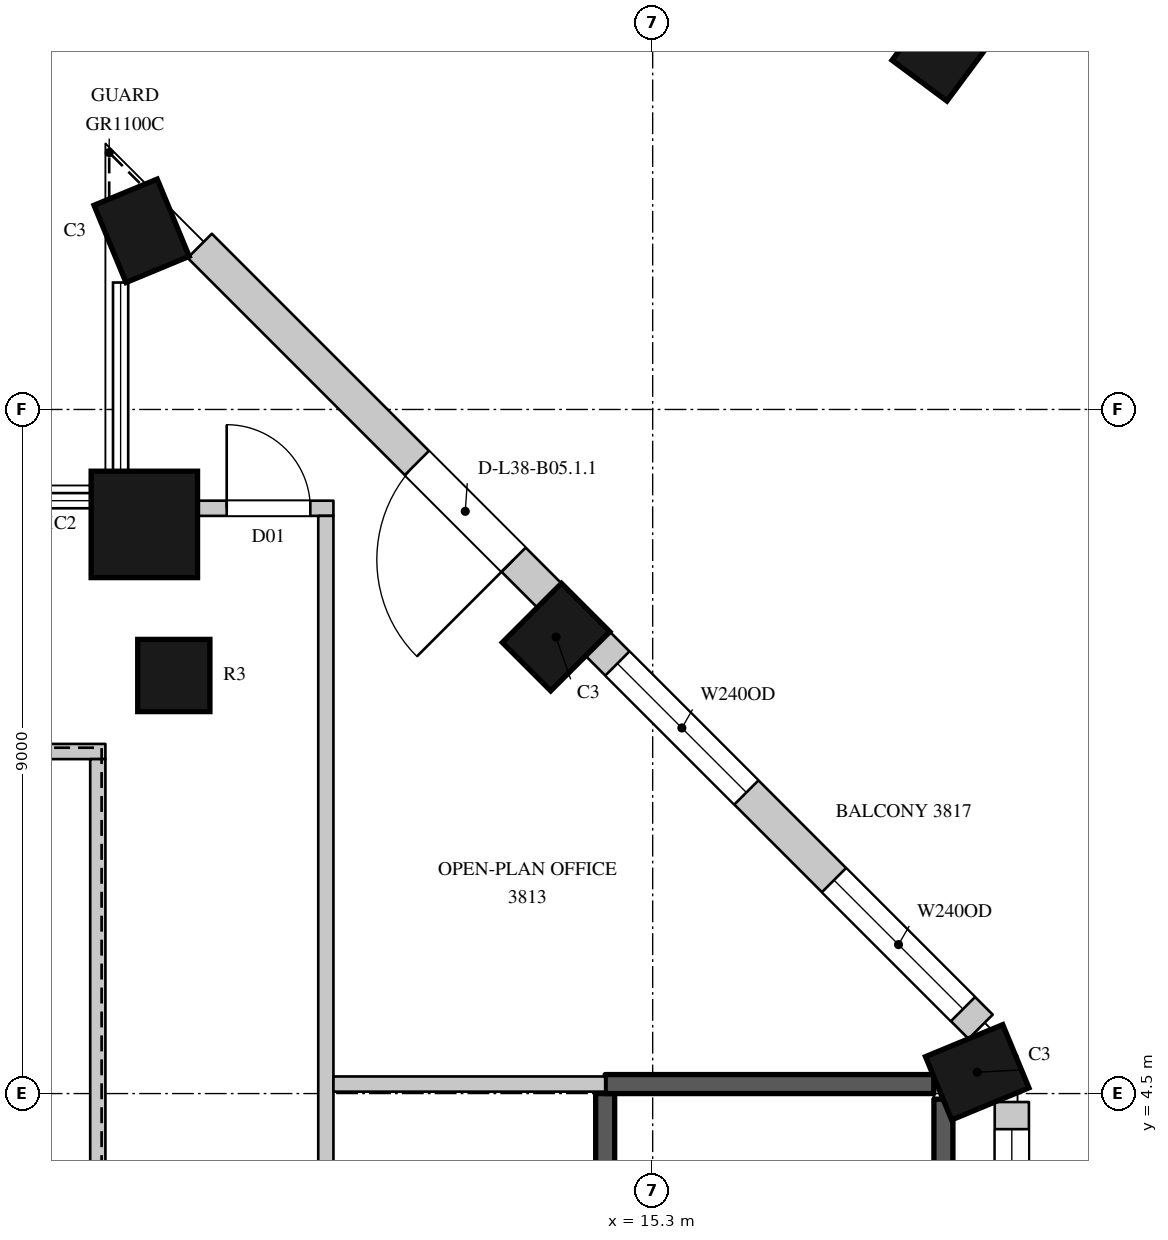
"""IFC4 building model, lengths in metres.
Left out: names, types, materials, properties, quantities, classifications, styles, units other than length and angle.
Written with IfcOpenShell. Run it as: python <this file> out.ifc"""

import sys

from ifc_helpers import new_model, si_unit, direction, frame, frame_2d, origin, origin_2d, place, context, subcontext, project, spatial, rectangle, circle, extrude, element, fill, save


model = new_model("IFC4")
c1 = context("Model", 3, precision=1e-05, world=origin(), true_north=direction((0.0, 1.0)))
c2 = subcontext(c1, "Body", "Model", "MODEL_VIEW")
j1 = project(units=[si_unit("LENGTHUNIT", "METRE"), si_unit("PLANEANGLEUNIT", "RADIAN")], contexts=[c1])
p1 = place(None, origin())
s1 = spatial("IfcSite", under=j1, at=p1, CompositionType="ELEMENT")
p2 = place(p1, origin())
s2 = spatial("IfcBuilding", under=s1, at=p2, CompositionType="ELEMENT")
p3 = place(p2, frame((0.0, 0.0, 176.9)))
s3 = spatial("IfcBuildingStorey", under=s2, at=p3, CompositionType="ELEMENT", Elevation=176.9)
for number, where, z_axis, x_axis in (
    (1, (19.57, 4.78, 0.0), (0.0, 0.0, 1.0), (-0.383, 0.924, 0.0)),
    (2, (14.029, 10.505, 0.0), (0.0, 0.0, 1.0), (-0.707, 0.707, 0.0)),
    (3, (8.576, 15.85, 0.0), (0.0, 0.0, 1.0), (-0.924, -0.383, 0.0)),
):
    element("IfcColumn", number, at=place(p3, frame(where, z_axis=z_axis, x_axis=x_axis)), inside=s3, PredefinedType="COLUMN", context=c2, shape_type="SweptSolid", body=[
        extrude(rectangle(XDim=0.9, YDim=1.1, at=origin_2d()), origin(), (0.0, 0.0, 1.0), 4.1),
    ])
p4 = place(p3, frame((8.612, 11.988, 0.0), z_axis=(0.0, 0.0, 1.0), x_axis=(1.0, 0.0, 0.0)))
e4 = element("IfcColumn", 4, at=p4, inside=s3, PredefinedType="COLUMN", context=c2, shape_type="SweptSolid", body=[
    extrude(circle(Radius=0.7, at=origin_2d()), origin(), (0.0, 0.0, 1.0), 4.1),
])
p5 = place(p3, frame((19.138, 18.268, 0.0), z_axis=(0.0, 0.0, 1.0), x_axis=(-0.802798546114, 0.596250362144, 0.0)))
e5 = element("IfcColumn", 5, at=p5, inside=s3, PredefinedType="COLUMN", context=c2, shape_type="SweptSolid", body=[
    extrude(rectangle(XDim=0.9, YDim=1.1, at=origin_2d()), origin(), (0.0, 0.0, 1.0), 4.1),
])
p6 = place(p3, frame((9.0, 10.0, 0.0), z_axis=(0.0, 0.0, 1.0), x_axis=(1.0, 0.0, 0.0)))
e6 = element("IfcColumn", 6, at=p6, inside=s3, PredefinedType="COLUMN", context=c2, shape_type="SweptSolid", body=[
    extrude(circle(Radius=0.475, at=origin_2d()), origin(), (0.0, 0.0, 1.0), 4.1),
])
p7 = place(p3, frame((20.025, -4.05, 0.0), z_axis=(0.0, 0.0, 1.0), x_axis=(0.0, 1.0, 0.0)))
e7 = element("IfcWall", 7, at=p7, inside=s3, PredefinedType="SOLIDWALL", context=c2, shape_type="SweptSolid", body=[
    extrude(rectangle(XDim=8.439, YDim=0.45, at=frame_2d((4.219, 0.0))), origin(), (0.0, 0.0, 1.0), 3.8),
])
p8 = place(p7, frame((0.394, 0.0, 1.05)))
e8 = element("IfcOpeningElement", 8, at=p8, cuts=e7, PredefinedType="OPENING", context=c2, shape_type="SweptSolid", body=[
    extrude(rectangle(XDim=3.0, YDim=2.4, at=frame_2d((1.5, 1.2))), frame((0.0, 0.235, 0.0), z_axis=(0.0, -1.0, 0.0), x_axis=(1.0, 0.0, 0.0)), (0.0, 0.0, 1.0), 0.47),
])
p9 = place(p7, frame((5.082, 0.0, 1.05)))
e9 = element("IfcOpeningElement", 9, at=p9, cuts=e7, PredefinedType="OPENING", context=c2, shape_type="SweptSolid", body=[
    extrude(rectangle(XDim=3.0, YDim=2.4, at=frame_2d((1.5, 1.2))), frame((0.0, 0.235, 0.0), z_axis=(0.0, -1.0, 0.0), x_axis=(1.0, 0.0, 0.0)), (0.0, 0.0, 1.0), 0.47),
])
p10 = place(p3, frame((19.615, 5.379, 0.0), z_axis=(0.0, 0.0, 1.0), x_axis=(-0.707089646058, 0.7071239159, 0.0)))
e10 = element("IfcWall", 10, at=p10, inside=s3, PredefinedType="SOLIDWALL", context=c2, shape_type="SweptSolid", body=[
    extrude(rectangle(XDim=7.124, YDim=0.45, at=frame_2d((3.562, 0.0))), origin(), (0.0, 0.0, 1.0), 3.8),
])
p11 = place(p10, frame((0.328, 0.0, 1.05)))
e11 = element("IfcOpeningElement", 11, at=p11, cuts=e10, PredefinedType="OPENING", context=c2, shape_type="SweptSolid", body=[
    extrude(rectangle(XDim=2.4, YDim=2.4, at=frame_2d((1.2, 1.2))), frame((0.0, 0.235, 0.0), z_axis=(0.0, -1.0, 0.0), x_axis=(1.0, 0.0, 0.0)), (0.0, 0.0, 1.0), 0.47),
])
p12 = place(p10, frame((4.359, 0.0, 1.05)))
e12 = element("IfcOpeningElement", 12, at=p12, cuts=e10, PredefinedType="OPENING", context=c2, shape_type="SweptSolid", body=[
    extrude(rectangle(XDim=2.4, YDim=2.4, at=frame_2d((1.2, 1.2))), frame((0.0, 0.235, 0.0), z_axis=(0.0, -1.0, 0.0), x_axis=(1.0, 0.0, 0.0)), (0.0, 0.0, 1.0), 0.47),
])
p13 = place(p3, frame((13.941, 11.053, 0.0), z_axis=(0.0, 0.0, 1.0), x_axis=(-0.707106781187, 0.707106781187, 0.0)))
e13 = element("IfcWall", 13, at=p13, inside=s3, PredefinedType="SOLIDWALL", context=c2, shape_type="SweptSolid", body=[
    extrude(rectangle(XDim=6.505, YDim=0.45, at=frame_2d((3.252, 0.0))), origin(), (0.0, 0.0, 1.0), 3.8),
])
p14 = place(p13, frame((0.665, 0.0, 0.0)))
e14 = element("IfcOpeningElement", 14, at=p14, cuts=e13, PredefinedType="OPENING", context=c2, shape_type="SweptSolid", body=[
    extrude(rectangle(XDim=1.8, YDim=2.4, at=frame_2d((0.9, 1.2))), frame((0.0, 0.235, 0.0), z_axis=(0.0, -1.0, 0.0), x_axis=(1.0, 0.0, 0.0)), (0.0, 0.0, 1.0), 0.47),
])
p15 = place(p3, frame((12.251, 14.263, 0.0), z_axis=(0.0, 0.0, 1.0), x_axis=(-0.707039709166, 0.707173846846, 0.0)))
e15 = element("IfcWall", 15, at=p15, inside=s3, PredefinedType="SOLIDWALL", context=c2, shape_type="SweptSolid", body=[
    extrude(rectangle(XDim=1.82, YDim=0.45, at=frame_2d((0.91, 0.0))), origin(), (0.0, 0.0, 1.0), 0.6),
])
p16 = place(p3, frame((-2.48, 9.0, 0.0), z_axis=(0.0, 0.0, 1.0), x_axis=(1.0, 0.0, 0.0)))
e16 = element("IfcWall", 16, at=p16, inside=s3, PredefinedType="PARTITIONING", context=c2, shape_type="SweptSolid", body=[
    extrude(rectangle(XDim=10.58, YDim=0.2, at=frame_2d((5.29, 0.0))), origin(), (0.0, 0.0, 1.0), 3.8),
])
p17 = place(p3, frame((8.0, -8.9, 0.0), z_axis=(0.0, 0.0, 1.0), x_axis=(0.0, 1.0, 0.0)))
e17 = element("IfcWall", 17, at=p17, inside=s3, PredefinedType="PARTITIONING", context=c2, shape_type="SweptSolid", body=[
    extrude(rectangle(XDim=17.8, YDim=0.2, at=frame_2d((8.9, 0.0))), origin(), (0.0, 0.0, 1.0), 3.8),
])
p18 = place(p3, frame((9.296, 12.2, 0.0), z_axis=(0.0, 0.0, 1.0), x_axis=(1.0, 0.0, 0.0)))
e18 = element("IfcWall", 18, at=p18, inside=s3, PredefinedType="PARTITIONING", context=c2, shape_type="SweptSolid", body=[
    extrude(rectangle(XDim=1.804, YDim=0.2, at=frame_2d((0.902, 0.0))), origin(), (0.0, 0.0, 1.0), 3.8),
])
p19 = place(p18, frame((0.4, 0.0, 0.0)))
e19 = element("IfcOpeningElement", 19, at=p19, cuts=e18, PredefinedType="OPENING", context=c2, shape_type="SweptSolid", body=[
    extrude(rectangle(XDim=1.1, YDim=2.4, at=frame_2d((0.55, 1.2))), frame((0.0, 0.11, 0.0), z_axis=(0.0, -1.0, 0.0), x_axis=(1.0, 0.0, 0.0)), (0.0, 0.0, 1.0), 0.22),
])
p20 = place(p3, frame((11.0, -12.0, 0.0), z_axis=(0.0, 0.0, 1.0), x_axis=(0.0, 1.0, 0.0)))
e20 = element("IfcWall", 20, at=p20, inside=s3, PredefinedType="PARTITIONING", context=c2, shape_type="SweptSolid", body=[
    extrude(rectangle(XDim=24.1, YDim=0.2, at=frame_2d((12.05, 0.0))), origin(), (0.0, 0.0, 1.0), 3.8),
])
p21 = place(p20, frame((9.85, 0.0, 0.0)))
e21 = element("IfcOpeningElement", 21, at=p21, cuts=e20, PredefinedType="OPENING", context=c2, shape_type="SweptSolid", body=[
    extrude(rectangle(XDim=1.5, YDim=2.4, at=frame_2d((0.75, 1.2))), frame((0.0, 0.11, 0.0), z_axis=(0.0, -1.0, 0.0), x_axis=(1.0, 0.0, 0.0)), (0.0, 0.0, 1.0), 0.22),
])
p22 = place(p20, frame((3.15, 0.0, 0.0)))
e22 = element("IfcOpeningElement", 22, at=p22, cuts=e20, PredefinedType="OPENING", context=c2, shape_type="SweptSolid", body=[
    extrude(rectangle(XDim=1.1, YDim=2.4, at=frame_2d((0.55, 1.2))), frame((0.0, 0.11, 0.0), z_axis=(0.0, -1.0, 0.0), x_axis=(1.0, 0.0, 0.0)), (0.0, 0.0, 1.0), 0.22),
])
p23 = place(p3, frame((11.1, 4.625, 0.0), z_axis=(0.0, 0.0, 1.0), x_axis=(1.0, 0.0, 0.0)))
e23 = element("IfcWall", 23, at=p23, inside=s3, PredefinedType="PARTITIONING", context=c2, shape_type="SweptSolid", body=[
    extrude(rectangle(XDim=3.575, YDim=0.2, at=frame_2d((1.788, 0.0))), origin(), (0.0, 0.0, 1.0), 3.8),
])
p24 = place(p3, frame((14.675, -4.5, 0.0), z_axis=(0.0, 0.0, 1.0), x_axis=(0.0, 1.0, 0.0)))
e24 = element("IfcWall", 24, at=p24, inside=s3, PredefinedType="SHEAR", context=c2, shape_type="SweptSolid", body=[
    extrude(rectangle(XDim=9.0, YDim=0.25, at=frame_2d((4.5, 0.0))), origin(), (0.0, 0.0, 1.0), 3.8),
])
p25 = place(p24, frame((0.45, 0.0, 0.0)))
e25 = element("IfcOpeningElement", 25, at=p25, cuts=e24, PredefinedType="OPENING", context=c2, shape_type="SweptSolid", body=[
    extrude(rectangle(XDim=1.1, YDim=2.2, at=frame_2d((0.55, 1.1))), frame((0.0, 0.135, 0.0), z_axis=(0.0, -1.0, 0.0), x_axis=(1.0, 0.0, 0.0)), (0.0, 0.0, 1.0), 0.27),
])
p26 = place(p3, frame((14.675, 4.625, 0.0), z_axis=(0.0, 0.0, 1.0), x_axis=(1.0, 0.0, 0.0)))
e26 = element("IfcWall", 26, at=p26, inside=s3, PredefinedType="SHEAR", context=c2, shape_type="SweptSolid", body=[
    extrude(rectangle(XDim=4.324, YDim=0.25, at=frame_2d((2.162, 0.0))), origin(), (0.0, 0.0, 1.0), 3.8),
])
p27 = place(p3, frame((19.125, -4.05, 0.0), z_axis=(0.0, 0.0, 1.0), x_axis=(0.0, 1.0, 0.0)))
e27 = element("IfcWall", 27, at=p27, inside=s3, PredefinedType="SHEAR", context=c2, shape_type="SweptSolid", body=[
    extrude(rectangle(XDim=8.477, YDim=0.25, at=frame_2d((4.238, 0.0))), origin(), (0.0, 0.0, 1.0), 3.8),
])
p28 = place(p9, origin())
e28 = element("IfcWindow", 28, at=p28, inside=s3, PartitioningType="SINGLE_PANEL", PredefinedType="WINDOW", context=c2, shape_type="SweptSolid", body=[
    extrude(rectangle(XDim=3.0, YDim=2.4, at=frame_2d((1.5, 1.2))), frame((0.0, 0.135, 0.0), z_axis=(0.0, -1.0, 0.0), x_axis=(1.0, 0.0, 0.0)), (0.0, 0.0, 1.0), 0.06),
])
fill(e9, e28)
p29 = place(p11, origin())
e29 = element("IfcWindow", 29, at=p29, inside=s3, PartitioningType="SINGLE_PANEL", PredefinedType="WINDOW", context=c2, shape_type="SweptSolid", body=[
    extrude(rectangle(XDim=2.4, YDim=2.4, at=frame_2d((1.2, 1.2))), frame((0.0, 0.135, 0.0), z_axis=(0.0, -1.0, 0.0), x_axis=(1.0, 0.0, 0.0)), (0.0, 0.0, 1.0), 0.06),
])
fill(e11, e29)
p30 = place(p12, origin())
e30 = element("IfcWindow", 30, at=p30, inside=s3, PartitioningType="SINGLE_PANEL", PredefinedType="WINDOW", context=c2, shape_type="SweptSolid", body=[
    extrude(rectangle(XDim=2.4, YDim=2.4, at=frame_2d((1.2, 1.2))), frame((0.0, 0.135, 0.0), z_axis=(0.0, -1.0, 0.0), x_axis=(1.0, 0.0, 0.0)), (0.0, 0.0, 1.0), 0.06),
])
fill(e12, e30)
p31 = place(p14, origin())
e31 = element("IfcDoor", 31, at=p31, inside=s3, OperationType="SLIDING_TO_LEFT", PredefinedType="DOOR", context=c2, shape_type="SweptSolid", body=[
    extrude(rectangle(XDim=1.8, YDim=2.4, at=frame_2d((0.9, 1.2))), frame((0.0, 0.13, 0.0), z_axis=(0.0, -1.0, 0.0), x_axis=(1.0, 0.0, 0.0)), (0.0, 0.0, 1.0), 0.05),
])
fill(e14, e31)
p32 = place(p19, origin())
e32 = element("IfcDoor", 32, at=p32, inside=s3, OperationType="SINGLE_SWING_LEFT", PredefinedType="DOOR", context=c2, shape_type="SweptSolid", body=[
    extrude(rectangle(XDim=1.1, YDim=2.4, at=frame_2d((0.55, 1.2))), frame((0.0, 0.025, 0.0), z_axis=(0.0, -1.0, 0.0), x_axis=(1.0, 0.0, 0.0)), (0.0, 0.0, 1.0), 0.05),
])
fill(e19, e32)
save(model, sys.argv[1])
